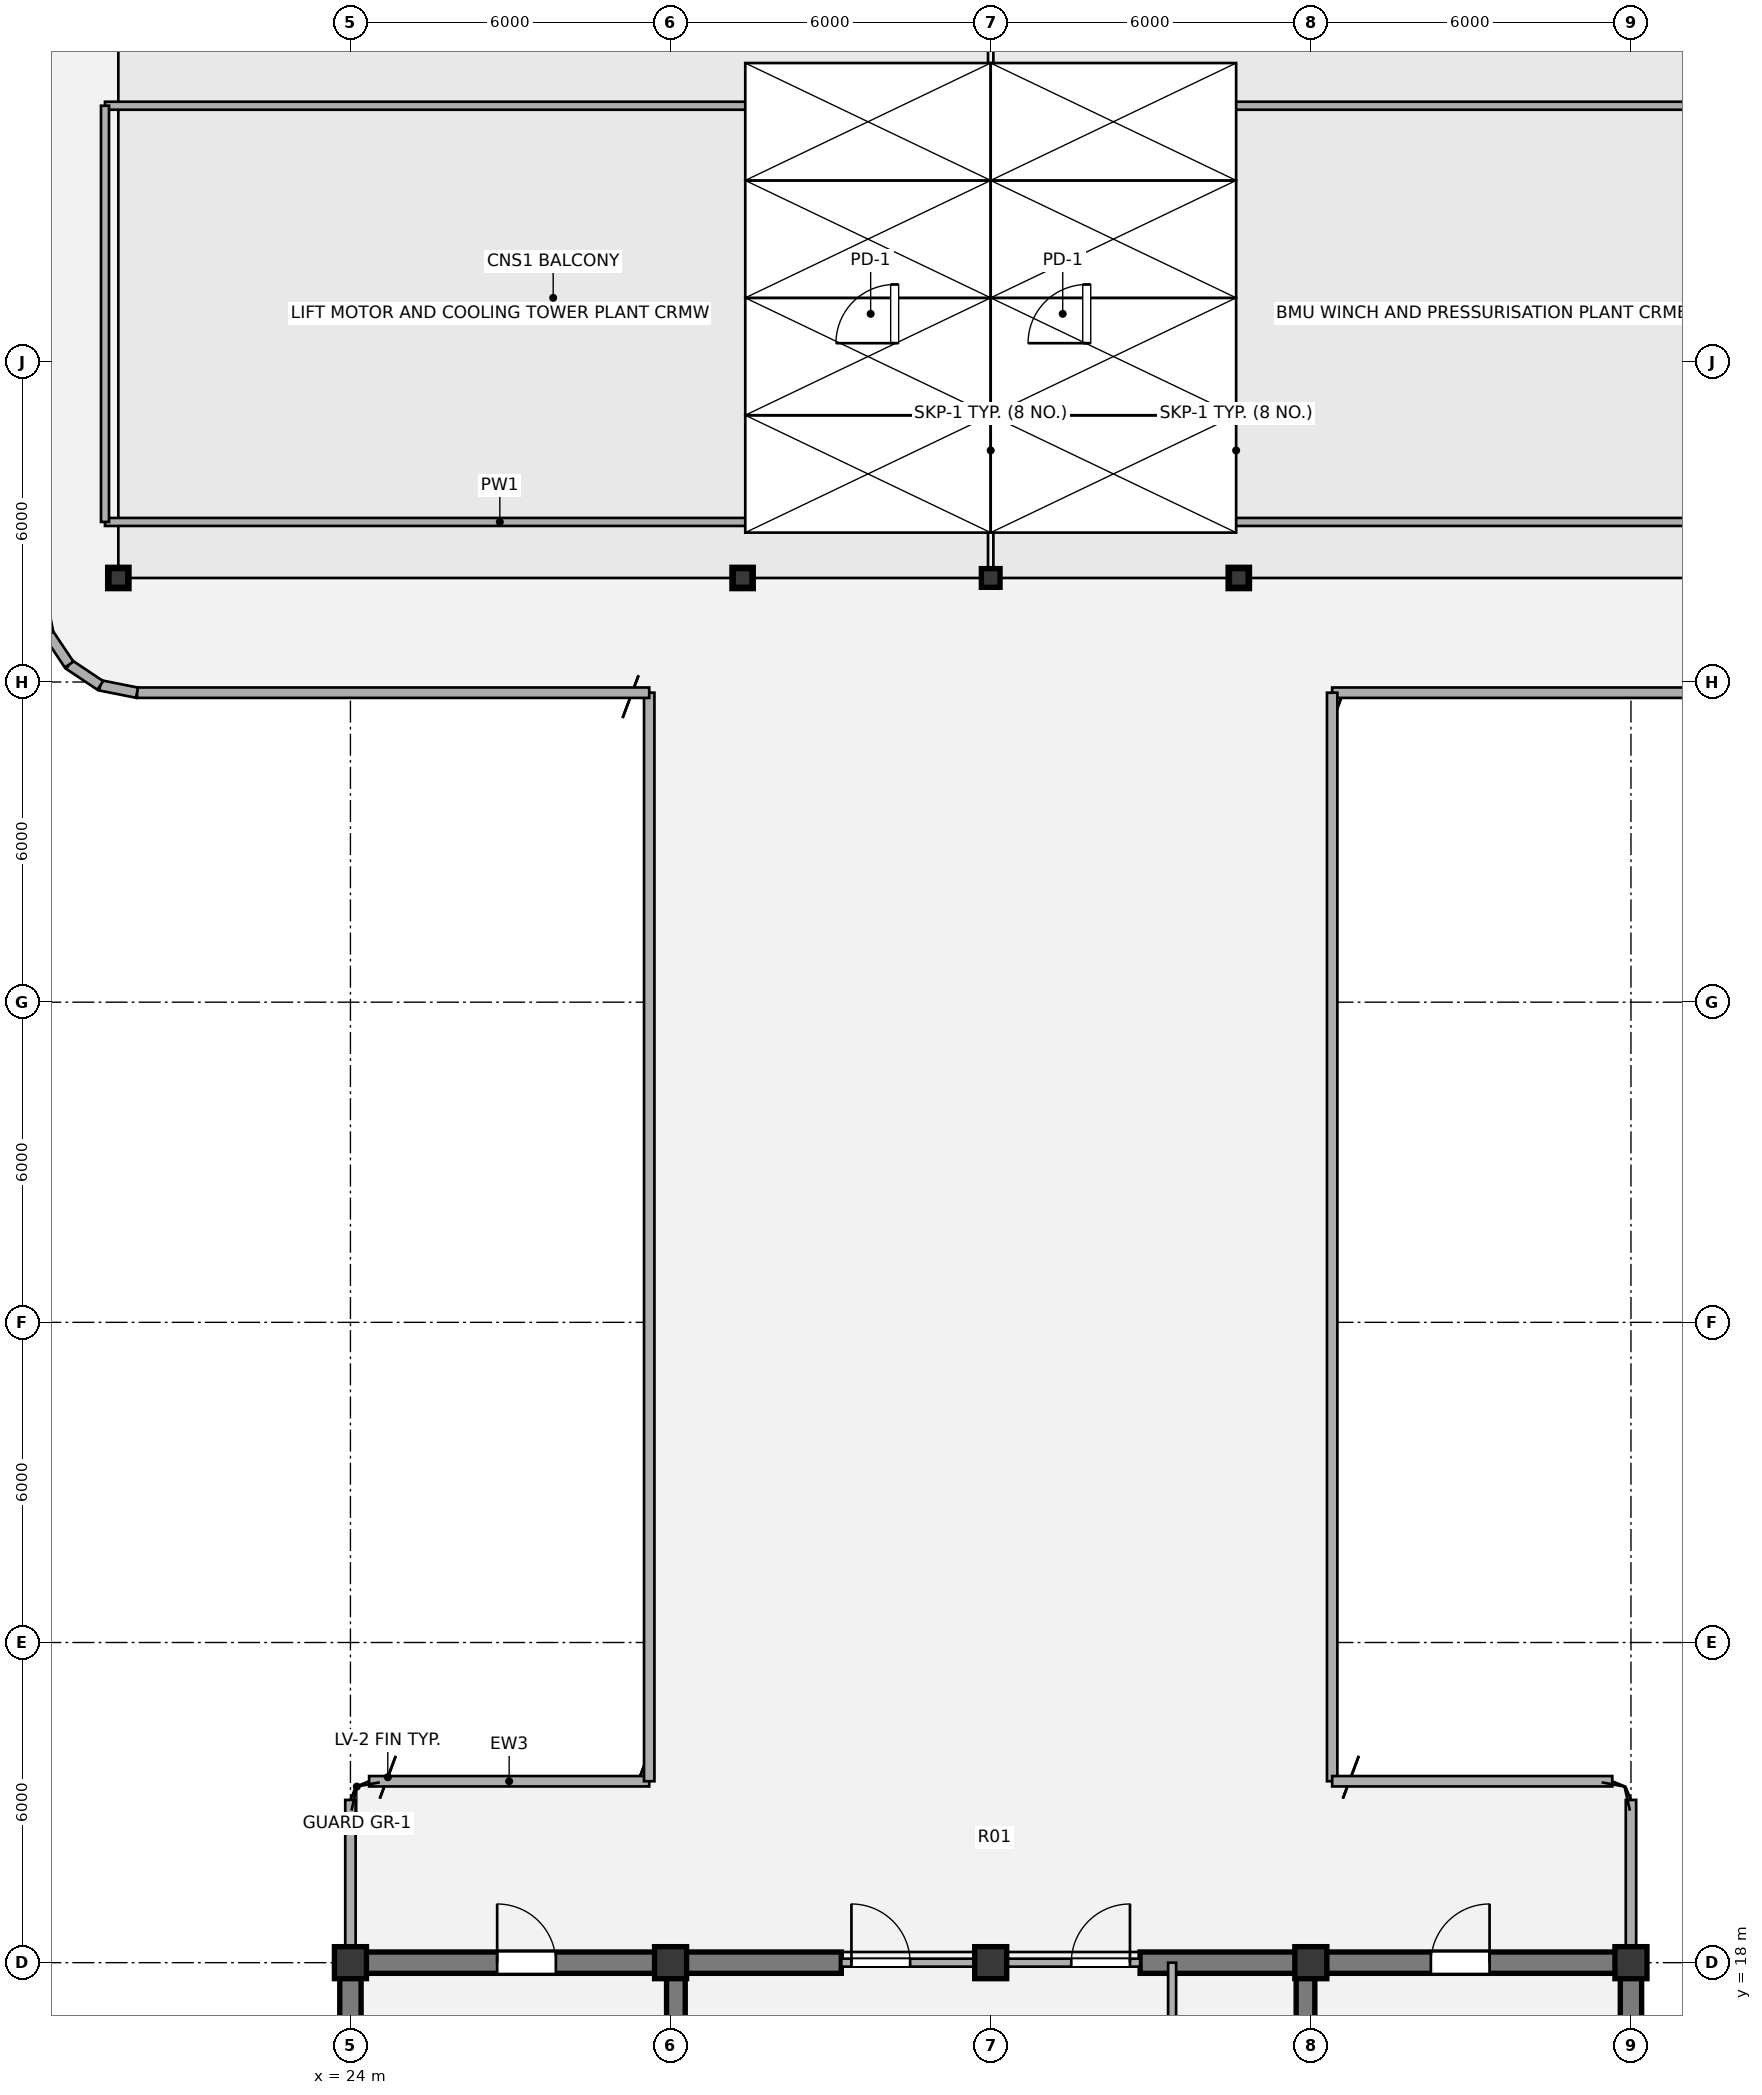
"""IFC4 building model, lengths in metres.
Left out: names, types, materials, properties, quantities, classifications, styles, units other than length and angle.
Written with IfcOpenShell. Run it as: python <this file> out.ifc"""

import sys

from ifc_helpers import new_model, si_unit, direction, frame, frame_2d, origin, origin_2d, place, context, subcontext, project, spatial, rectangle, hollow_rectangle, extrude, source, transform, mapped, element, fill, save


model = new_model("IFC4")
c1 = context("Model", 3, precision=1e-05, world=origin(), true_north=direction((0.0, 1.0)))
c2 = subcontext(c1, "Body", "Model", "MODEL_VIEW")
j1 = project(units=[si_unit("LENGTHUNIT", "METRE"), si_unit("PLANEANGLEUNIT", "RADIAN")], contexts=[c1])
p1 = place(None, origin())
s1 = spatial("IfcSite", under=j1, at=p1, CompositionType="ELEMENT")
p2 = place(p1, origin())
s2 = spatial("IfcBuilding", under=s1, at=p2, CompositionType="ELEMENT")
p3 = place(p2, frame((0.0, 0.0, 315.72)))
s3 = spatial("IfcBuildingStorey", under=s2, at=p3, CompositionType="ELEMENT", Elevation=315.72)
m1 = source(origin(), c2, "Body", "SweptSolid", [
    extrude(rectangle(XDim=0.6, YDim=0.6, at=origin_2d()), origin(), (0.0, 0.0, 1.0), 3.96),
])
for number, where, z_axis, x_axis in (
    (1, (24.0, 18.0, 0.0), (0.0, 0.0, 1.0), (1.0, 0.0, 0.0)),
    (2, (30.0, 18.0, 0.0), (0.0, 0.0, 1.0), (1.0, 0.0, 0.0)),
    (3, (36.0, 18.0, 0.0), (0.0, 0.0, 1.0), (1.0, 0.0, 0.0)),
    (4, (42.0, 18.0, 0.0), (0.0, 0.0, 1.0), (1.0, 0.0, 0.0)),
    (5, (48.0, 18.0, 0.0), (0.0, 0.0, 1.0), (1.0, 0.0, 0.0)),
):
    element("IfcColumn", number, at=place(p3, frame(where, z_axis=z_axis, x_axis=x_axis)), inside=s3, PredefinedType="COLUMN", context=c2, shape_type="MappedRepresentation", body=[
        mapped(m1, transform((0.0, 0.0, 0.0), x_axis=(1.0, 0.0, 0.0), y_axis=(0.0, 1.0, 0.0), z_axis=(0.0, 0.0, 1.0), scale=1.0)),
    ])
for number, where, z_axis, x_axis in (
    (6, (24.0, 6.0, 0.0), (0.0, 0.0, 1.0), (0.0, 1.0, 0.0)),
    (7, (48.0, 18.0, 0.0), (0.0, 0.0, 1.0), (0.0, -1.0, 0.0)),
):
    element("IfcWall", number, at=place(p3, frame(where, z_axis=z_axis, x_axis=x_axis)), inside=s3, PredefinedType="SHEAR", context=c2, shape_type="SweptSolid", body=[
        extrude(rectangle(XDim=12.0, YDim=0.4, at=frame_2d((6.0, 0.0))), origin(), (0.0, 0.0, 1.0), 3.96),
    ])
p4 = place(p3, frame((23.8, 18.0, 0.0), z_axis=(0.0, 0.0, 1.0), x_axis=(1.0, 0.0, 0.0)))
e8 = element("IfcWall", 8, at=p4, inside=s3, PredefinedType="SHEAR", context=c2, shape_type="SweptSolid", body=[
    extrude(rectangle(XDim=9.4, YDim=0.4, at=frame_2d((4.7, 0.0))), origin(), (0.0, 0.0, 1.0), 3.96),
])
p5 = place(p4, frame((2.95, 0.0, 0.0)))
e9 = element("IfcOpeningElement", 9, at=p5, cuts=e8, PredefinedType="OPENING", context=c2, shape_type="SweptSolid", body=[
    extrude(rectangle(XDim=1.1, YDim=2.1, at=origin_2d()), frame((0.55, 0.21, 1.05), z_axis=(0.0, -1.0, 0.0), x_axis=(1.0, 0.0, 0.0)), (0.0, 0.0, 1.0), 0.42),
])
p6 = place(p3, frame((38.8, 18.0, 0.0), z_axis=(0.0, 0.0, 1.0), x_axis=(1.0, 0.0, 0.0)))
e10 = element("IfcWall", 10, at=p6, inside=s3, PredefinedType="SHEAR", context=c2, shape_type="SweptSolid", body=[
    extrude(rectangle(XDim=9.4, YDim=0.4, at=frame_2d((4.7, 0.0))), origin(), (0.0, 0.0, 1.0), 3.96),
])
p7 = place(p6, frame((5.45, 0.0, 0.0)))
e11 = element("IfcOpeningElement", 11, at=p7, cuts=e10, PredefinedType="OPENING", context=c2, shape_type="SweptSolid", body=[
    extrude(rectangle(XDim=1.1, YDim=2.1, at=origin_2d()), frame((0.55, 0.21, 1.05), z_axis=(0.0, -1.0, 0.0), x_axis=(1.0, 0.0, 0.0)), (0.0, 0.0, 1.0), 0.42),
])
for number, where, z_axis, x_axis in (
    (12, (30.1, 6.0, 0.0), (0.0, 0.0, 1.0), (0.0, 1.0, 0.0)),
    (13, (41.9, 18.0, 0.0), (0.0, 0.0, 1.0), (0.0, -1.0, 0.0)),
):
    element("IfcWall", number, at=place(p3, frame(where, z_axis=z_axis, x_axis=x_axis)), inside=s3, PredefinedType="SHEAR", context=c2, shape_type="SweptSolid", body=[
        extrude(rectangle(XDim=12.0, YDim=0.35, at=frame_2d((6.0, 0.0))), origin(), (0.0, 0.0, 1.0), 3.96),
    ])
m2 = source(origin(), c2, "Body", "SweptSolid", [
    extrude(hollow_rectangle(XDim=0.4, YDim=0.4, WallThickness=0.02, OuterFilletRadius=0.04, at=origin_2d()), origin(), (0.0, 0.0, 1.0), 3.96),
])
for number, where, z_axis, x_axis in (
    (14, (19.65, 43.95, 0.0), (0.0, 0.0, 1.0), (1.0, 0.0, 0.0)),
    (15, (31.35, 43.95, 0.0), (0.0, 0.0, 1.0), (1.0, 0.0, 0.0)),
    (16, (40.65, 43.95, 0.0), (0.0, 0.0, 1.0), (1.0, 0.0, 0.0)),
):
    element("IfcColumn", number, at=place(p3, frame(where, z_axis=z_axis, x_axis=x_axis)), inside=s3, PredefinedType="COLUMN", context=c2, shape_type="MappedRepresentation", body=[
        mapped(m2, transform((0.0, 0.0, 0.0), x_axis=(1.0, 0.0, 0.0), y_axis=(0.0, 1.0, 0.0), z_axis=(0.0, 0.0, 1.0), scale=1.0)),
    ])
m3 = source(origin(), c2, "Body", "SweptSolid", [
    extrude(hollow_rectangle(XDim=0.35, YDim=0.35, WallThickness=0.016, OuterFilletRadius=0.032, at=origin_2d()), origin(), (0.0, 0.0, 1.0), 0.354),
])
p8 = place(p3, frame((19.65, 43.95, 3.96), z_axis=(0.0, 0.0, 1.0), x_axis=(1.0, 0.0, 0.0)))
e17 = element("IfcColumn", 17, at=p8, inside=s3, PredefinedType="COLUMN", context=c2, shape_type="MappedRepresentation", body=[
    mapped(m3, transform((0.0, 0.0, 0.0), x_axis=(1.0, 0.0, 0.0), y_axis=(0.0, 1.0, 0.0), z_axis=(0.0, 0.0, 1.0), scale=1.0)),
])
m4 = source(origin(), c2, "Body", "SweptSolid", [
    extrude(hollow_rectangle(XDim=0.35, YDim=0.35, WallThickness=0.016, OuterFilletRadius=0.032, at=origin_2d()), origin(), (0.0, 0.0, 1.0), 1.345),
])
for number, where, z_axis, x_axis in (
    (18, (31.35, 43.95, 3.96), (0.0, 0.0, 1.0), (1.0, 0.0, 0.0)),
    (19, (40.65, 43.95, 3.96), (0.0, 0.0, 1.0), (1.0, 0.0, 0.0)),
):
    element("IfcColumn", number, at=place(p3, frame(where, z_axis=z_axis, x_axis=x_axis)), inside=s3, PredefinedType="COLUMN", context=c2, shape_type="MappedRepresentation", body=[
        mapped(m4, transform((0.0, 0.0, 0.0), x_axis=(1.0, 0.0, 0.0), y_axis=(0.0, 1.0, 0.0), z_axis=(0.0, 0.0, 1.0), scale=1.0)),
    ])
m5 = source(origin(), c2, "Body", "SweptSolid", [
    extrude(hollow_rectangle(XDim=0.35, YDim=0.35, WallThickness=0.016, OuterFilletRadius=0.032, at=origin_2d()), origin(), (0.0, 0.0, 1.0), 2.104),
])
p9 = place(p3, frame((36.0, 43.95, 3.59), z_axis=(0.0, 0.0, 1.0), x_axis=(1.0, 0.0, 0.0)))
e20 = element("IfcColumn", 20, at=p9, inside=s3, PredefinedType="COLUMN", context=c2, shape_type="MappedRepresentation", body=[
    mapped(m5, transform((0.0, 0.0, 0.0), x_axis=(1.0, 0.0, 0.0), y_axis=(0.0, 1.0, 0.0), z_axis=(0.0, 0.0, 1.0), scale=1.0)),
])
for number, where, z_axis, x_axis in (
    (21, (48.0, 21.05, 0.0), (0.0, 0.0, 1.0), (0.0, -1.0, 0.0)),
    (22, (24.0, 18.28, 0.0), (0.0, 0.0, 1.0), (0.0, 1.0, 0.0)),
):
    element("IfcWall", number, at=place(p3, frame(where, z_axis=z_axis, x_axis=x_axis)), inside=s3, PredefinedType="SOLIDWALL", context=c2, shape_type="SweptSolid", body=[
        extrude(rectangle(XDim=2.77, YDim=0.195, at=frame_2d((1.385, 0.0))), origin(), (0.0, 0.0, 1.0), 2.828),
    ])
p10 = place(p3, frame((24.35, 21.4, 0.0), z_axis=(0.0, 0.0, 1.0), x_axis=(1.0, 0.0, 0.0)))
e23 = element("IfcWall", 23, at=p10, inside=s3, PredefinedType="SOLIDWALL", context=c2, shape_type="SweptSolid", body=[
    extrude(rectangle(XDim=5.25, YDim=0.195, at=frame_2d((2.625, 0.0))), origin(), (0.0, 0.0, 1.0), 3.64),
])
p11 = place(p3, frame((29.6, 21.4, 0.0), z_axis=(0.0, 0.0, 1.0), x_axis=(0.0, 1.0, 0.0)))
e24 = element("IfcWall", 24, at=p11, inside=s3, PredefinedType="SOLIDWALL", context=c2, shape_type="SweptSolid", body=[
    extrude(rectangle(XDim=20.4, YDim=0.195, at=frame_2d((10.2, 0.0))), origin(), (0.0, 0.0, 1.0), 2.928),
])
p12 = place(p3, frame((29.6, 41.8, 0.0), z_axis=(0.0, 0.0, 1.0), x_axis=(-1.0, 0.0, 0.0)))
e25 = element("IfcWall", 25, at=p12, inside=s3, PredefinedType="SOLIDWALL", context=c2, shape_type="SweptSolid", body=[
    extrude(rectangle(XDim=9.6, YDim=0.195, at=frame_2d((4.8, 0.0))), origin(), (0.0, 0.0, 1.0), 3.64),
])
p13 = place(p3, frame((20.0, 41.8, 0.0), z_axis=(0.0, 0.0, 1.0), x_axis=(-0.980794046625, 0.195046246068, 0.0)))
e26 = element("IfcWall", 26, at=p13, inside=s3, PredefinedType="SOLIDWALL", context=c2, shape_type="SweptSolid", body=[
    extrude(rectangle(XDim=0.702, YDim=0.195, at=frame_2d((0.351, 0.0))), origin(), (0.0, 0.0, 1.0), 3.64),
])
for number, where, z_axis, x_axis in (
    (27, (19.311, 41.937, 0.0), (0.0, 0.0, 1.0), (-0.832, 0.556, 0.0)),
    (28, (18.727, 42.327, 0.0), (0.0, 0.0, 1.0), (-0.556, 0.831, 0.0)),
    (29, (18.337, 42.911, 0.0), (0.0, 0.0, 1.0), (-0.195, 0.981, 0.0)),
):
    element("IfcWall", number, at=place(p3, frame(where, z_axis=z_axis, x_axis=x_axis)), inside=s3, PredefinedType="SOLIDWALL", context=c2, shape_type="SweptSolid", body=[
        extrude(rectangle(XDim=0.702, YDim=0.195, at=frame_2d((0.351, 0.0))), origin(), (0.0, 0.0, 1.0), 3.64),
    ])
p14 = place(p3, frame((52.0, 41.8, 0.0), z_axis=(0.0, 0.0, 1.0), x_axis=(-1.0, 0.0, 0.0)))
e30 = element("IfcWall", 30, at=p14, inside=s3, PredefinedType="SOLIDWALL", context=c2, shape_type="SweptSolid", body=[
    extrude(rectangle(XDim=9.6, YDim=0.195, at=frame_2d((4.8, 0.0))), origin(), (0.0, 0.0, 1.0), 3.64),
])
p15 = place(p3, frame((42.4, 41.8, 0.0), z_axis=(0.0, 0.0, 1.0), x_axis=(0.0, -1.0, 0.0)))
e31 = element("IfcWall", 31, at=p15, inside=s3, PredefinedType="SOLIDWALL", context=c2, shape_type="SweptSolid", body=[
    extrude(rectangle(XDim=20.4, YDim=0.195, at=frame_2d((10.2, 0.0))), origin(), (0.0, 0.0, 1.0), 2.928),
])
p16 = place(p3, frame((42.4, 21.4, 0.0), z_axis=(0.0, 0.0, 1.0), x_axis=(1.0, 0.0, 0.0)))
e32 = element("IfcWall", 32, at=p16, inside=s3, PredefinedType="SOLIDWALL", context=c2, shape_type="SweptSolid", body=[
    extrude(rectangle(XDim=5.25, YDim=0.195, at=frame_2d((2.625, 0.0))), origin(), (0.0, 0.0, 1.0), 3.64),
])
p17 = place(p3, frame((39.4, 11.0, 0.0), z_axis=(0.0, 0.0, 1.0), x_axis=(0.0, 1.0, 0.0)))
e33 = element("IfcWall", 33, at=p17, inside=s3, PredefinedType="PARTITIONING", context=c2, shape_type="SweptSolid", body=[
    extrude(rectangle(XDim=7.0, YDim=0.15, at=frame_2d((3.5, 0.0))), origin(), (0.0, 0.0, 1.0), 3.61),
])
p18 = place(p17, frame((2.4, 0.0, 0.0)))
e34 = element("IfcOpeningElement", 34, at=p18, cuts=e33, PredefinedType="OPENING", context=c2, shape_type="SweptSolid", body=[
    extrude(rectangle(XDim=1.1, YDim=2.1, at=origin_2d()), frame((0.55, 0.085, 1.05), z_axis=(0.0, -1.0, 0.0), x_axis=(1.0, 0.0, 0.0)), (0.0, 0.0, 1.0), 0.17),
])
p19 = place(p3, frame((33.2, 18.0, 0.0), z_axis=(0.0, 0.0, 1.0), x_axis=(1.0, 0.0, 0.0)))
e35 = element("IfcWall", 35, at=p19, inside=s3, PredefinedType="PARTITIONING", context=c2, shape_type="SweptSolid", body=[
    extrude(rectangle(XDim=5.6, YDim=0.15, at=frame_2d((2.8, 0.0))), origin(), (0.0, 0.0, 1.0), 2.625),
])
p20 = place(p19, frame((0.19, 0.0, 0.0)))
e36 = element("IfcOpeningElement", 36, at=p20, cuts=e35, PredefinedType="OPENING", context=c2, shape_type="SweptSolid", body=[
    extrude(rectangle(XDim=1.1, YDim=2.1, at=origin_2d()), frame((0.55, 0.085, 1.05), z_axis=(0.0, -1.0, 0.0), x_axis=(1.0, 0.0, 0.0)), (0.0, 0.0, 1.0), 0.17),
])
p21 = place(p19, frame((4.31, 0.0, 0.0)))
e37 = element("IfcOpeningElement", 37, at=p21, cuts=e35, PredefinedType="OPENING", context=c2, shape_type="SweptSolid", body=[
    extrude(rectangle(XDim=1.1, YDim=2.1, at=origin_2d()), frame((0.55, 0.085, 1.05), z_axis=(0.0, -1.0, 0.0), x_axis=(1.0, 0.0, 0.0)), (0.0, 0.0, 1.0), 0.17),
])
for number, where, z_axis, x_axis in (
    (38, (19.4, 45.0, 0.0), (0.0, 0.0, 1.0), (1.0, 0.0, 0.0)),
    (39, (37.8, 45.0, 0.0), (0.0, 0.0, 1.0), (1.0, 0.0, 0.0)),
    (40, (19.4, 52.8, 0.0), (0.0, 0.0, 1.0), (1.0, 0.0, 0.0)),
    (41, (37.8, 52.8, 0.0), (0.0, 0.0, 1.0), (1.0, 0.0, 0.0)),
):
    element("IfcWall", number, at=place(p3, frame(where, z_axis=z_axis, x_axis=x_axis)), inside=s3, PredefinedType="PARTITIONING", context=c2, shape_type="SweptSolid", body=[
        extrude(rectangle(XDim=14.8, YDim=0.15, at=frame_2d((7.4, 0.0))), origin(), (0.0, 0.0, 1.0), 3.092),
    ])
p22 = place(p3, frame((19.4, 45.0, 0.0), z_axis=(0.0, 0.0, 1.0), x_axis=(0.0, 1.0, 0.0)))
e42 = element("IfcWall", 42, at=p22, inside=s3, PredefinedType="PARTITIONING", context=c2, shape_type="SweptSolid", body=[
    extrude(rectangle(XDim=7.8, YDim=0.15, at=frame_2d((3.9, 0.0))), origin(), (0.0, 0.0, 1.0), 2.925),
])
p23 = place(p3, frame((34.2, 45.0, 0.0), z_axis=(0.0, 0.0, 1.0), x_axis=(0.0, 1.0, 0.0)))
e43 = element("IfcWall", 43, at=p23, inside=s3, PredefinedType="PARTITIONING", context=c2, shape_type="SweptSolid", body=[
    extrude(rectangle(XDim=7.8, YDim=0.15, at=frame_2d((3.9, 0.0))), origin(), (0.0, 0.0, 1.0), 3.61),
])
p24 = place(p23, frame((3.35, 0.0, 0.0)))
e44 = element("IfcOpeningElement", 44, at=p24, cuts=e43, PredefinedType="OPENING", context=c2, shape_type="SweptSolid", body=[
    extrude(rectangle(XDim=1.1, YDim=2.1, at=origin_2d()), frame((0.55, 0.085, 1.05), z_axis=(0.0, -1.0, 0.0), x_axis=(1.0, 0.0, 0.0)), (0.0, 0.0, 1.0), 0.17),
])
p25 = place(p3, frame((37.8, 45.0, 0.0), z_axis=(0.0, 0.0, 1.0), x_axis=(0.0, 1.0, 0.0)))
e45 = element("IfcWall", 45, at=p25, inside=s3, PredefinedType="PARTITIONING", context=c2, shape_type="SweptSolid", body=[
    extrude(rectangle(XDim=7.8, YDim=0.15, at=frame_2d((3.9, 0.0))), origin(), (0.0, 0.0, 1.0), 3.61),
])
p26 = place(p25, frame((3.35, 0.0, 0.0)))
e46 = element("IfcOpeningElement", 46, at=p26, cuts=e45, PredefinedType="OPENING", context=c2, shape_type="SweptSolid", body=[
    extrude(rectangle(XDim=1.1, YDim=2.1, at=origin_2d()), frame((0.55, 0.085, 1.05), z_axis=(0.0, -1.0, 0.0), x_axis=(1.0, 0.0, 0.0)), (0.0, 0.0, 1.0), 0.17),
])
m6 = source(origin(), c2, "Body", "SweptSolid", [
    extrude(rectangle(XDim=1.1, YDim=2.1, at=origin_2d()), frame((0.55, 0.025, 1.05), z_axis=(0.0, -1.0, 0.0), x_axis=(1.0, 0.0, 0.0)), (0.0, 0.0, 1.0), 0.05),
])
p27 = place(p20, origin())
e47 = element("IfcDoor", 47, at=p27, inside=s3, OperationType="SINGLE_SWING_LEFT", PredefinedType="DOOR", context=c2, shape_type="MappedRepresentation", body=[
    mapped(m6, transform((0.0, 0.0, 0.0), x_axis=(1.0, 0.0, 0.0), y_axis=(0.0, 1.0, 0.0), z_axis=(0.0, 0.0, 1.0), scale=1.0)),
])
fill(e36, e47)
p28 = place(p21, origin())
e48 = element("IfcDoor", 48, at=p28, inside=s3, OperationType="SINGLE_SWING_RIGHT", PredefinedType="DOOR", context=c2, shape_type="MappedRepresentation", body=[
    mapped(m6, transform((0.0, 0.0, 0.0), x_axis=(1.0, 0.0, 0.0), y_axis=(0.0, 1.0, 0.0), z_axis=(0.0, 0.0, 1.0), scale=1.0)),
])
fill(e37, e48)
p29 = place(p5, origin())
e49 = element("IfcDoor", 49, at=p29, inside=s3, OperationType="SINGLE_SWING_LEFT", PredefinedType="DOOR", context=c2, shape_type="MappedRepresentation", body=[
    mapped(m6, transform((0.0, 0.0, 0.0), x_axis=(1.0, 0.0, 0.0), y_axis=(0.0, 1.0, 0.0), z_axis=(0.0, 0.0, 1.0), scale=1.0)),
])
fill(e9, e49)
p30 = place(p7, origin())
e50 = element("IfcDoor", 50, at=p30, inside=s3, OperationType="SINGLE_SWING_RIGHT", PredefinedType="DOOR", context=c2, shape_type="MappedRepresentation", body=[
    mapped(m6, transform((0.0, 0.0, 0.0), x_axis=(1.0, 0.0, 0.0), y_axis=(0.0, 1.0, 0.0), z_axis=(0.0, 0.0, 1.0), scale=1.0)),
])
fill(e11, e50)
m7 = source(origin(), c2, "Body", "SweptSolid", [
    extrude(rectangle(XDim=1.1, YDim=2.1, at=origin_2d()), frame((0.55, 0.025, 1.05), z_axis=(0.0, -1.0, 0.0), x_axis=(1.0, 0.0, 0.0)), (0.0, 0.0, 1.0), 0.05),
])
p31 = place(p24, origin())
e51 = element("IfcDoor", 51, at=p31, inside=s3, OperationType="SINGLE_SWING_LEFT", PredefinedType="DOOR", context=c2, shape_type="MappedRepresentation", body=[
    mapped(m7, transform((0.0, 0.0, 0.0), x_axis=(1.0, 0.0, 0.0), y_axis=(0.0, 1.0, 0.0), z_axis=(0.0, 0.0, 1.0), scale=1.0)),
])
fill(e44, e51)
p32 = place(p26, origin())
e52 = element("IfcDoor", 52, at=p32, inside=s3, OperationType="SINGLE_SWING_LEFT", PredefinedType="DOOR", context=c2, shape_type="MappedRepresentation", body=[
    mapped(m7, transform((0.0, 0.0, 0.0), x_axis=(1.0, 0.0, 0.0), y_axis=(0.0, 1.0, 0.0), z_axis=(0.0, 0.0, 1.0), scale=1.0)),
])
fill(e46, e52)
save(model, sys.argv[1])
